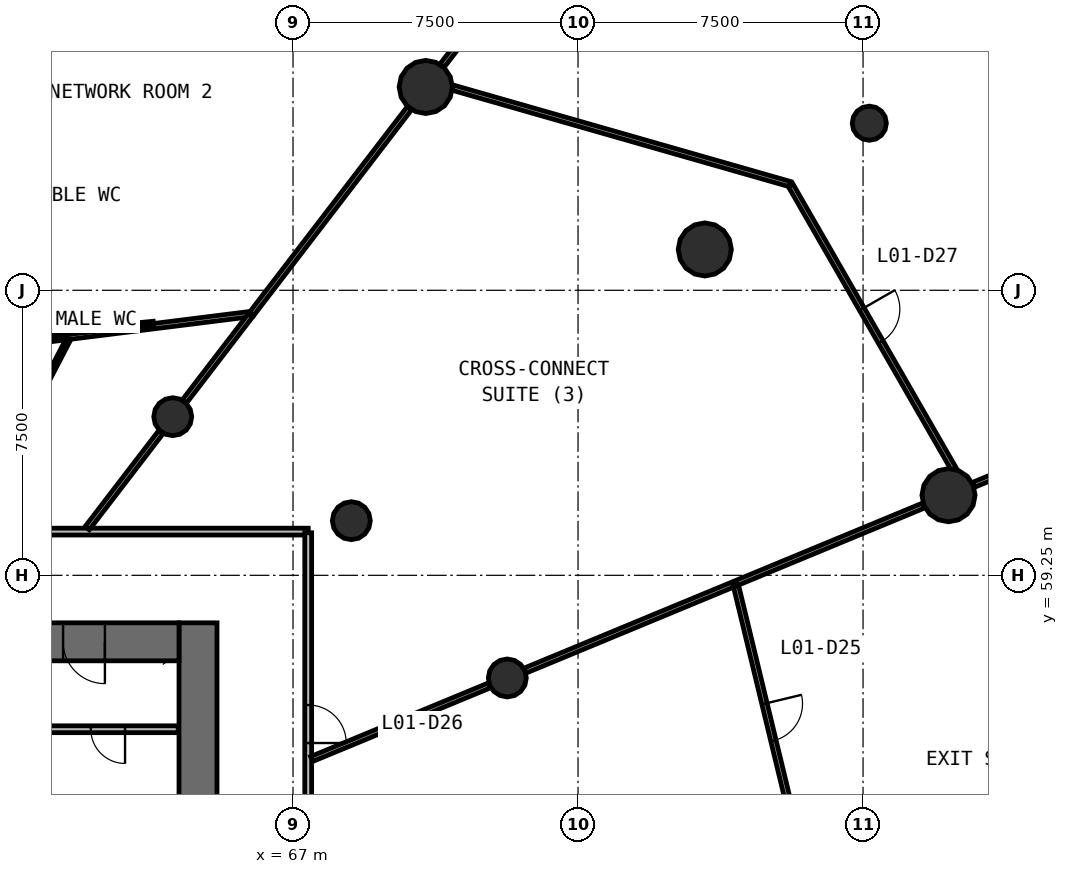
"""IFC4 building model, lengths in metres.
Left out: names, types, materials, properties, quantities, classifications, styles, units other than length and angle.
Written with IfcOpenShell. Run it as: python <this file> out.ifc"""

import sys

from ifc_helpers import new_model, si_unit, direction, frame, frame_2d, origin, origin_2d, place, context, subcontext, project, spatial, rectangle, circle, extrude, source, transform, mapped, element, fill, save


model = new_model("IFC4")
c1 = context("Model", 3, precision=1e-05, world=origin(), true_north=direction((0.0, 1.0)))
c2 = subcontext(c1, "Body", "Model", "MODEL_VIEW")
j1 = project(units=[si_unit("LENGTHUNIT", "METRE"), si_unit("PLANEANGLEUNIT", "RADIAN")], contexts=[c1])
p1 = place(None, origin())
s1 = spatial("IfcSite", under=j1, at=p1, CompositionType="ELEMENT")
p2 = place(p1, origin())
s2 = spatial("IfcBuilding", under=s1, at=p2, CompositionType="ELEMENT")
p3 = place(p2, frame((0.0, 0.0, 5.0)))
s3 = spatial("IfcBuildingStorey", under=s2, at=p3, CompositionType="ELEMENT", Elevation=5.0)
p4 = place(p3, frame((64.5, 38.0, 0.0), z_axis=(0.0, 0.0, 1.0), x_axis=(0.0, 1.0, 0.0)))
e1 = element("IfcWall", 1, at=p4, inside=s3, PredefinedType="SHEAR", context=c2, shape_type="SweptSolid", body=[
    extrude(rectangle(XDim=20.0, YDim=1.0, at=frame_2d((10.0, 0.0))), origin(), (0.0, 0.0, 1.0), 4.4),
])
p5 = place(p4, frame((9.1, 0.0, 0.0)))
e2 = element("IfcOpeningElement", 2, at=p5, cuts=e1, PredefinedType="OPENING", context=c2, shape_type="SweptSolid", body=[
    extrude(rectangle(XDim=1.8, YDim=2.1, at=frame_2d((0.9, 1.05))), frame((0.0, 0.51, 0.0), z_axis=(0.0, -1.0, 0.0), x_axis=(1.0, 0.0, 0.0)), (0.0, 0.0, 1.0), 1.02),
])
p6 = place(p3, frame((64.0, 57.5, 0.0), z_axis=(0.0, 0.0, 1.0), x_axis=(-1.0, 0.0, 0.0)))
e3 = element("IfcWall", 3, at=p6, inside=s3, PredefinedType="SHEAR", context=c2, shape_type="SweptSolid", body=[
    extrude(rectangle(XDim=24.0, YDim=1.0, at=frame_2d((12.0, 0.0))), origin(), (0.0, 0.0, 1.0), 4.4),
])
p7 = place(p6, frame((21.45, 0.0, 0.0)))
e4 = element("IfcOpeningElement", 4, at=p7, cuts=e3, PredefinedType="OPENING", context=c2, shape_type="SweptSolid", body=[
    extrude(rectangle(XDim=1.1, YDim=2.1, at=frame_2d((0.55, 1.05))), frame((0.0, 0.51, 0.0), z_axis=(0.0, -1.0, 0.0), x_axis=(1.0, 0.0, 0.0)), (0.0, 0.0, 1.0), 1.02),
])
p8 = place(p6, frame((1.95, 0.0, 0.0)))
e5 = element("IfcOpeningElement", 5, at=p8, cuts=e3, PredefinedType="OPENING", context=c2, shape_type="SweptSolid", body=[
    extrude(rectangle(XDim=1.1, YDim=2.1, at=frame_2d((0.55, 1.05))), frame((0.0, 0.51, 0.0), z_axis=(0.0, -1.0, 0.0), x_axis=(1.0, 0.0, 0.0)), (0.0, 0.0, 1.0), 1.02),
])
m1 = source(origin(), c2, "Body", "SweptSolid", [
    extrude(circle(Radius=0.7, at=origin_2d()), origin(), (0.0, 0.0, 1.0), 4.4),
])
for number, where, z_axis, x_axis in (
    (6, (84.249, 61.358, 0.0), (0.0, 0.0, 1.0), (1.0, 0.0, 0.0)),
    (7, (77.836, 67.824, 0.0), (0.0, 0.0, 1.0), (1.0, 0.0, 0.0)),
    (8, (70.492, 72.1, 0.0), (0.0, 0.0, 1.0), (1.0, 0.0, 0.0)),
):
    element("IfcColumn", number, at=place(p3, frame(where, z_axis=z_axis, x_axis=x_axis)), inside=s3, PredefinedType="COLUMN", context=c2, shape_type="MappedRepresentation", body=[
        mapped(m1, transform((0.0, 0.0, 0.0), scale=1.0)),
    ])
m2 = source(origin(), c2, "Body", "SweptSolid", [
    extrude(circle(Radius=0.5, at=origin_2d()), origin(), (0.0, 0.0, 1.0), 4.4),
])
for number, where, z_axis, x_axis in (
    (9, (72.639, 56.549, 0.0), (0.0, 0.0, 1.0), (1.0, 0.0, 0.0)),
    (10, (68.535, 60.688, 0.0), (0.0, 0.0, 1.0), (1.0, 0.0, 0.0)),
    (11, (63.835, 63.424, 0.0), (0.0, 0.0, 1.0), (1.0, 0.0, 0.0)),
):
    element("IfcColumn", number, at=place(p3, frame(where, z_axis=z_axis, x_axis=x_axis)), inside=s3, PredefinedType="COLUMN", context=c2, shape_type="MappedRepresentation", body=[
        mapped(m2, transform((0.0, 0.0, 0.0), scale=1.0)),
    ])
m3 = source(origin(), c2, "Body", "SweptSolid", [
    extrude(circle(Radius=0.45, at=origin_2d()), origin(), (0.0, 0.0, 1.0), 4.4),
])
p9 = place(p3, frame((82.165, 71.146, 0.0), z_axis=(0.0, 0.0, 1.0), x_axis=(1.0, 0.0, 0.0)))
e12 = element("IfcColumn", 12, at=p9, inside=s3, PredefinedType="COLUMN", context=c2, shape_type="MappedRepresentation", body=[
    mapped(m3, transform((0.0, 0.0, 0.0), scale=1.0)),
])
p10 = place(p3, frame((36.6, 60.4, 0.0), z_axis=(0.0, 0.0, 1.0), x_axis=(1.0, 0.0, 0.0)))
e13 = element("IfcWall", 13, at=p10, inside=s3, PredefinedType="PARTITIONING", context=c2, shape_type="SweptSolid", body=[
    extrude(rectangle(XDim=30.8, YDim=0.18, at=frame_2d((15.4, 0.0))), origin(), (0.0, 0.0, 1.0), 3.25),
])
p11 = place(p10, frame((22.25, 0.0, 0.0)))
e14 = element("IfcOpeningElement", 14, at=p11, cuts=e13, PredefinedType="OPENING", context=c2, shape_type="SweptSolid", body=[
    extrude(rectangle(XDim=0.9, YDim=2.1, at=frame_2d((0.45, 1.05))), frame((0.0, 0.1, 0.0), z_axis=(0.0, -1.0, 0.0), x_axis=(1.0, 0.0, 0.0)), (0.0, 0.0, 1.0), 0.2),
])
p12 = place(p10, frame((19.65, 0.0, 0.0)))
e15 = element("IfcOpeningElement", 15, at=p12, cuts=e13, PredefinedType="OPENING", context=c2, shape_type="SweptSolid", body=[
    extrude(rectangle(XDim=0.9, YDim=2.1, at=frame_2d((0.45, 1.05))), frame((0.0, 0.1, 0.0), z_axis=(0.0, -1.0, 0.0), x_axis=(1.0, 0.0, 0.0)), (0.0, 0.0, 1.0), 0.2),
])
p13 = place(p10, frame((17.25, 0.0, 0.0)))
e16 = element("IfcOpeningElement", 16, at=p13, cuts=e13, PredefinedType="OPENING", context=c2, shape_type="SweptSolid", body=[
    extrude(rectangle(XDim=0.9, YDim=2.1, at=frame_2d((0.45, 1.05))), frame((0.0, 0.1, 0.0), z_axis=(0.0, -1.0, 0.0), x_axis=(1.0, 0.0, 0.0)), (0.0, 0.0, 1.0), 0.2),
])
p14 = place(p10, frame((14.95, 0.0, 0.0)))
e17 = element("IfcOpeningElement", 17, at=p14, cuts=e13, PredefinedType="OPENING", context=c2, shape_type="SweptSolid", body=[
    extrude(rectangle(XDim=1.0, YDim=2.1, at=frame_2d((0.5, 1.05))), frame((0.0, 0.1, 0.0), z_axis=(0.0, -1.0, 0.0), x_axis=(1.0, 0.0, 0.0)), (0.0, 0.0, 1.0), 0.2),
])
p15 = place(p3, frame((67.4, 60.37, 0.0), z_axis=(0.0, 0.0, 1.0), x_axis=(0.0, -1.0, 0.0)))
e18 = element("IfcWall", 18, at=p15, inside=s3, PredefinedType="PARTITIONING", context=c2, shape_type="SweptSolid", body=[
    extrude(rectangle(XDim=23.583, YDim=0.18, at=frame_2d((11.791, 0.0))), origin(), (0.0, 0.0, 1.0), 3.25),
])
p16 = place(p15, frame((11.333, 0.0, 0.0)))
e19 = element("IfcOpeningElement", 19, at=p16, cuts=e18, PredefinedType="OPENING", context=c2, shape_type="SweptSolid", body=[
    extrude(rectangle(XDim=1.0, YDim=2.1, at=frame_2d((0.5, 1.05))), frame((0.0, 0.1, 0.0), z_axis=(0.0, -1.0, 0.0), x_axis=(1.0, 0.0, 0.0)), (0.0, 0.0, 1.0), 0.2),
])
p17 = place(p15, frame((4.532, 0.0, 0.0)))
e20 = element("IfcOpeningElement", 20, at=p17, cuts=e18, PredefinedType="OPENING", context=c2, shape_type="SweptSolid", body=[
    extrude(rectangle(XDim=1.0, YDim=2.1, at=frame_2d((0.5, 1.05))), frame((0.0, 0.1, 0.0), z_axis=(0.0, -1.0, 0.0), x_axis=(1.0, 0.0, 0.0)), (0.0, 0.0, 1.0), 0.2),
])
p18 = place(p15, frame((19.133, 0.0, 0.0)))
e21 = element("IfcOpeningElement", 21, at=p18, cuts=e18, PredefinedType="OPENING", context=c2, shape_type="SweptSolid", body=[
    extrude(rectangle(XDim=1.0, YDim=2.1, at=frame_2d((0.5, 1.05))), frame((0.0, 0.1, 0.0), z_axis=(0.0, -1.0, 0.0), x_axis=(1.0, 0.0, 0.0)), (0.0, 0.0, 1.0), 0.2),
])
p19 = place(p3, frame((63.98, 55.2, 0.0), z_axis=(0.0, 0.0, 1.0), x_axis=(-1.0, 0.0, 0.0)))
e22 = element("IfcWall", 22, at=p19, inside=s3, PredefinedType="PARTITIONING", context=c2, shape_type="SweptSolid", body=[
    extrude(rectangle(XDim=3.75, YDim=0.18, at=frame_2d((1.875, 0.0))), origin(), (0.0, 0.0, 1.0), 4.05),
])
p20 = place(p19, frame((1.4, 0.0, 0.0)))
e23 = element("IfcOpeningElement", 23, at=p20, cuts=e22, PredefinedType="OPENING", context=c2, shape_type="SweptSolid", body=[
    extrude(rectangle(XDim=0.9, YDim=2.1, at=frame_2d((0.45, 1.05))), frame((0.0, 0.1, 0.0), z_axis=(0.0, -1.0, 0.0), x_axis=(1.0, 0.0, 0.0)), (0.0, 0.0, 1.0), 0.2),
])
p21 = place(p3, frame((80.076, 69.544, 0.0), z_axis=(0.0, 0.0, 1.0), x_axis=(-0.961447102661, 0.27498994306, 0.0)))
e24 = element("IfcWall", 24, at=p21, inside=s3, PredefinedType="PARTITIONING", context=c2, shape_type="SweptSolid", body=[
    extrude(rectangle(XDim=9.236, YDim=0.14, at=frame_2d((4.618, 0.0))), origin(), (0.0, 0.0, 1.0), 3.25),
])
p22 = place(p3, frame((80.091, 69.518, 0.0), z_axis=(0.0, 0.0, 1.0), x_axis=(0.498474851257, -0.866904160023, 0.0)))
e25 = element("IfcWall", 25, at=p22, inside=s3, PredefinedType="PARTITIONING", context=c2, shape_type="SweptSolid", body=[
    extrude(rectangle(XDim=8.615, YDim=0.14, at=frame_2d((4.308, 0.0))), origin(), (0.0, 0.0, 1.0), 3.25),
])
p23 = place(p22, frame((3.765, 0.0, 0.0)))
e26 = element("IfcOpeningElement", 26, at=p23, cuts=e25, PredefinedType="OPENING", context=c2, shape_type="SweptSolid", body=[
    extrude(rectangle(XDim=1.0, YDim=2.1, at=frame_2d((0.5, 1.05))), frame((0.0, 0.08, 0.0), z_axis=(0.0, -1.0, 0.0), x_axis=(1.0, 0.0, 0.0)), (0.0, 0.0, 1.0), 0.16),
])
p24 = place(p3, frame((78.642, 59.035, 0.0), z_axis=(0.0, 0.0, 1.0), x_axis=(0.235066566732, -0.971979274061, 0.0)))
e27 = element("IfcWall", 27, at=p24, inside=s3, PredefinedType="PARTITIONING", context=c2, shape_type="SweptSolid", body=[
    extrude(rectangle(XDim=7.506, YDim=0.14, at=frame_2d((3.753, 0.0))), origin(), (0.0, 0.0, 1.0), 3.25),
])
p25 = place(p24, frame((3.256, 0.0, 0.0)))
e28 = element("IfcOpeningElement", 28, at=p25, cuts=e27, PredefinedType="OPENING", context=c2, shape_type="SweptSolid", body=[
    extrude(rectangle(XDim=1.0, YDim=2.1, at=frame_2d((0.5, 1.05))), frame((0.0, 0.08, 0.0), z_axis=(0.0, -1.0, 0.0), x_axis=(1.0, 0.0, 0.0)), (0.0, 0.0, 1.0), 0.16),
])
p26 = place(p3, frame((70.921, 72.658, 0.0), z_axis=(0.0, 0.0, 1.0), x_axis=(0.608788506125, 0.793332562555, 0.0)))
e29 = element("IfcWall", 29, at=p26, inside=s3, PredefinedType="PARTITIONING", context=c2, shape_type="SweptSolid", body=[
    extrude(rectangle(XDim=6.963, YDim=0.14, at=frame_2d((3.481, 0.0))), origin(), (0.0, 0.0, 1.0), 3.25),
])
p27 = place(p26, frame((3.05, 0.0, 0.0)))
e30 = element("IfcOpeningElement", 30, at=p27, cuts=e29, PredefinedType="OPENING", context=c2, shape_type="SweptSolid", body=[
    extrude(rectangle(XDim=1.0, YDim=2.1, at=frame_2d((0.5, 1.05))), frame((0.0, 0.08, 0.0), z_axis=(0.0, -1.0, 0.0), x_axis=(1.0, 0.0, 0.0)), (0.0, 0.0, 1.0), 0.16),
])
p28 = place(p3, frame((65.909, 66.127, 0.0), z_axis=(0.0, 0.0, 1.0), x_axis=(0.608773229352, 0.79334428543, 0.0)))
e31 = element("IfcWall", 31, at=p28, inside=s3, PredefinedType="PARTITIONING", context=c2, shape_type="SweptSolid", body=[
    extrude(rectangle(XDim=6.824, YDim=0.14, at=frame_2d((3.412, 0.0))), origin(), (0.0, 0.0, 1.0), 3.25),
])
p29 = place(p3, frame((65.88, 66.124, 0.0), z_axis=(0.0, 0.0, 1.0), x_axis=(-0.992269737838, -0.124099828249, 0.0)))
e32 = element("IfcWall", 32, at=p29, inside=s3, PredefinedType="PARTITIONING", context=c2, shape_type="SweptSolid", body=[
    extrude(rectangle(XDim=6.463, YDim=0.14, at=frame_2d((3.231, 0.0))), origin(), (0.0, 0.0, 1.0), 3.25),
])
p30 = place(p3, frame((73.106, 56.742, 0.0), z_axis=(0.0, 0.0, 1.0), x_axis=(0.923863045068, 0.382723234148, 0.0)))
e33 = element("IfcWall", 33, at=p30, inside=s3, PredefinedType="PARTITIONING", context=c2, shape_type="SweptSolid", body=[
    extrude(rectangle(XDim=5.921, YDim=0.14, at=frame_2d((2.96, 0.0))), origin(), (0.0, 0.0, 1.0), 3.25),
])
p31 = place(p3, frame((78.669, 59.047, 0.0), z_axis=(0.0, 0.0, 1.0), x_axis=(0.923891330959, 0.382654947151, 0.0)))
e34 = element("IfcWall", 34, at=p31, inside=s3, PredefinedType="PARTITIONING", context=c2, shape_type="SweptSolid", body=[
    extrude(rectangle(XDim=5.334, YDim=0.14, at=frame_2d((2.667, 0.0))), origin(), (0.0, 0.0, 1.0), 3.25),
])
p32 = place(p3, frame((67.49, 54.416, 0.0), z_axis=(0.0, 0.0, 1.0), x_axis=(0.923890025086, 0.382658100067, 0.0)))
e35 = element("IfcWall", 35, at=p32, inside=s3, PredefinedType="PARTITIONING", context=c2, shape_type="SweptSolid", body=[
    extrude(rectangle(XDim=5.068, YDim=0.14, at=frame_2d((2.534, 0.0))), origin(), (0.0, 0.0, 1.0), 3.25),
])
p33 = place(p3, frame((84.9, 61.628, 0.0), z_axis=(0.0, 0.0, 1.0), x_axis=(0.923871522787, 0.382702768979, 0.0)))
e36 = element("IfcWall", 36, at=p33, inside=s3, PredefinedType="PARTITIONING", context=c2, shape_type="SweptSolid", body=[
    extrude(rectangle(XDim=4.28, YDim=0.14, at=frame_2d((2.14, 0.0))), origin(), (0.0, 0.0, 1.0), 3.25),
])
p34 = place(p3, frame((61.584, 60.49, 0.0), z_axis=(0.0, 0.0, 1.0), x_axis=(0.60874605662, 0.793365135703, 0.0)))
e37 = element("IfcWall", 37, at=p34, inside=s3, PredefinedType="PARTITIONING", context=c2, shape_type="SweptSolid", body=[
    extrude(rectangle(XDim=3.194, YDim=0.14, at=frame_2d((1.597, 0.0))), origin(), (0.0, 0.0, 1.0), 3.25),
])
p35 = place(p3, frame((64.142, 63.824, 0.0), z_axis=(0.0, 0.0, 1.0), x_axis=(0.608770075861, 0.793346705253, 0.0)))
e38 = element("IfcWall", 38, at=p35, inside=s3, PredefinedType="PARTITIONING", context=c2, shape_type="SweptSolid", body=[
    extrude(rectangle(XDim=2.861, YDim=0.14, at=frame_2d((1.431, 0.0))), origin(), (0.0, 0.0, 1.0), 3.25),
])
p36 = place(p3, frame((58.502, 60.49, 0.0), z_axis=(0.0, 0.0, 1.0), x_axis=(0.461744214497, 0.887013123002, 0.0)))
e39 = element("IfcWall", 39, at=p36, inside=s3, PredefinedType="PARTITIONING", context=c2, shape_type="SweptSolid", body=[
    extrude(rectangle(XDim=5.596, YDim=0.12, at=frame_2d((2.798, 0.0))), origin(), (0.0, 0.0, 1.0), 3.25),
])
p37 = place(p3, frame((63.328, 65.875, 0.0), z_axis=(0.0, 0.0, 1.0), x_axis=(-0.995247178859, -0.097380968234, 0.0)))
e40 = element("IfcWall", 40, at=p37, inside=s3, PredefinedType="PARTITIONING", context=c2, shape_type="SweptSolid", body=[
    extrude(rectangle(XDim=2.141, YDim=0.12, at=frame_2d((1.071, 0.0))), origin(), (0.0, 0.0, 1.0), 3.25),
])
p38 = place(p3, frame((61.167, 65.661, 0.0), z_axis=(0.0, 0.0, 1.0), x_axis=(-0.982722635862, -0.18508436175, 0.0)))
e41 = element("IfcWall", 41, at=p38, inside=s3, PredefinedType="PARTITIONING", context=c2, shape_type="SweptSolid", body=[
    extrude(rectangle(XDim=0.907, YDim=0.12, at=frame_2d((0.454, 0.0))), origin(), (0.0, 0.0, 1.0), 3.25),
])
m4 = source(origin(), c2, "Body", "SweptSolid", [
    extrude(rectangle(XDim=1.1, YDim=2.1, at=frame_2d((0.55, 1.05))), frame((0.0, 0.025, 0.0), z_axis=(0.0, -1.0, 0.0), x_axis=(1.0, 0.0, 0.0)), (0.0, 0.0, 1.0), 0.05),
])
p39 = place(p8, origin())
e42 = element("IfcDoor", 42, at=p39, inside=s3, OperationType="SINGLE_SWING_LEFT", PredefinedType="DOOR", context=c2, shape_type="MappedRepresentation", body=[
    mapped(m4, transform((0.0, 0.0, 0.0), scale=1.0)),
])
fill(e5, e42)
m5 = source(origin(), c2, "Body", "SweptSolid", [
    extrude(rectangle(XDim=1.0, YDim=2.1, at=frame_2d((0.5, 1.05))), frame((0.0, 0.025, 0.0), z_axis=(0.0, -1.0, 0.0), x_axis=(1.0, 0.0, 0.0)), (0.0, 0.0, 1.0), 0.05),
])
p40 = place(p25, origin())
e43 = element("IfcDoor", 43, at=p40, inside=s3, OperationType="SINGLE_SWING_LEFT", PredefinedType="DOOR", context=c2, shape_type="MappedRepresentation", body=[
    mapped(m5, transform((0.0, 0.0, 0.0), scale=1.0)),
])
fill(e28, e43)
p41 = place(p17, origin())
e44 = element("IfcDoor", 44, at=p41, inside=s3, OperationType="SINGLE_SWING_RIGHT", PredefinedType="DOOR", context=c2, shape_type="MappedRepresentation", body=[
    mapped(m5, transform((0.0, 0.0, 0.0), scale=1.0)),
])
fill(e20, e44)
p42 = place(p23, origin())
e45 = element("IfcDoor", 45, at=p42, inside=s3, OperationType="SINGLE_SWING_LEFT", PredefinedType="DOOR", context=c2, shape_type="MappedRepresentation", body=[
    mapped(m5, transform((0.0, 0.0, 0.0), scale=1.0)),
])
fill(e26, e45)
m6 = source(origin(), c2, "Body", "SweptSolid", [
    extrude(rectangle(XDim=0.9, YDim=2.1, at=frame_2d((0.45, 1.05))), frame((0.0, 0.025, 0.0), z_axis=(0.0, -1.0, 0.0), x_axis=(1.0, 0.0, 0.0)), (0.0, 0.0, 1.0), 0.05),
])
p43 = place(p20, origin())
e46 = element("IfcDoor", 46, at=p43, inside=s3, OperationType="SINGLE_SWING_LEFT", PredefinedType="DOOR", context=c2, shape_type="MappedRepresentation", body=[
    mapped(m6, transform((0.0, 0.0, 0.0), scale=1.0)),
])
fill(e23, e46)
save(model, sys.argv[1])
